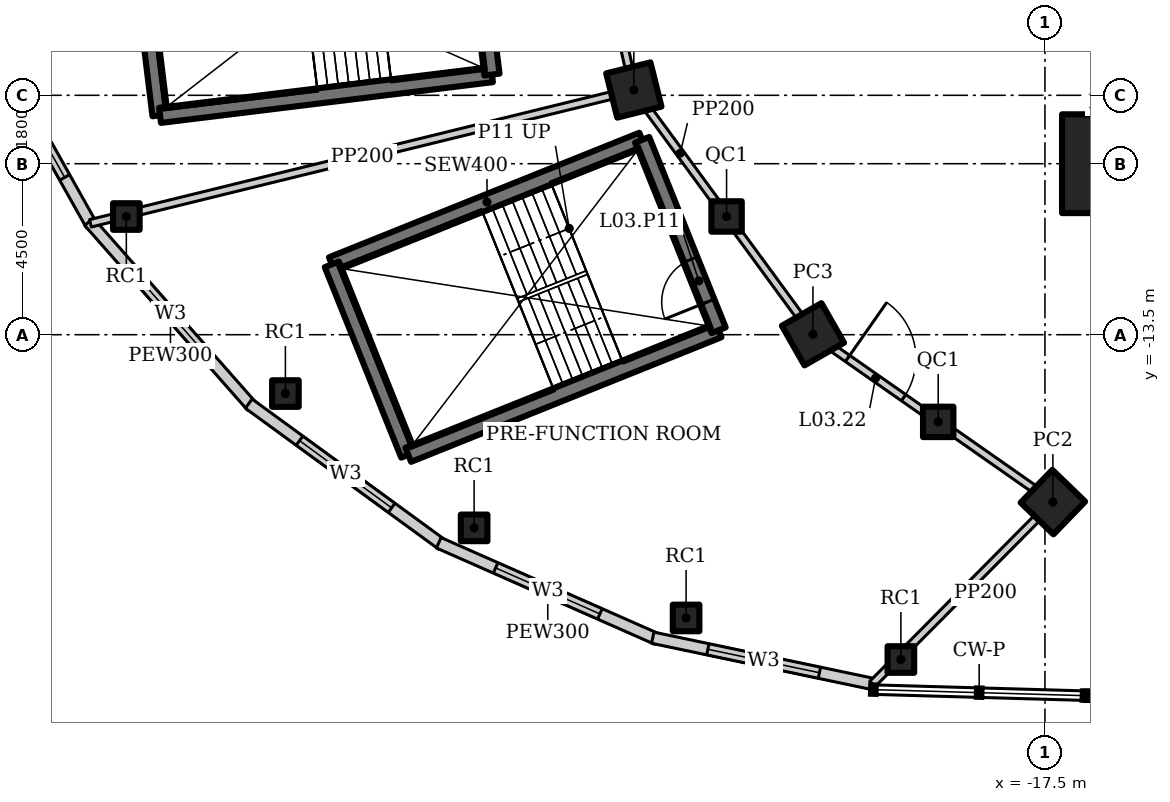
"""IFC4 building model, lengths in metres.
Left out: names, types, materials, properties, quantities, classifications, styles, units other than length and angle.
Written with IfcOpenShell. Run it as: python <this file> out.ifc"""

import sys

from ifc_helpers import new_model, si_unit, direction, frame, frame_2d, origin, origin_2d, place, context, subcontext, project, spatial, rectangle, hollow_rectangle, extrude, element, fill, save


model = new_model("IFC4")
c1 = context("Model", 3, precision=1e-05, world=origin(), true_north=direction((0.0, 1.0)))
c2 = subcontext(c1, "Body", "Model", "MODEL_VIEW")
j1 = project(units=[si_unit("LENGTHUNIT", "METRE"), si_unit("PLANEANGLEUNIT", "RADIAN")], contexts=[c1])
p1 = place(None, origin())
s1 = spatial("IfcSite", under=j1, at=p1, CompositionType="ELEMENT")
p2 = place(p1, origin())
s2 = spatial("IfcBuilding", under=s1, at=p2, CompositionType="ELEMENT")
p3 = place(p2, frame((0.0, 0.0, 22.0)))
s3 = spatial("IfcBuildingStorey", under=s2, at=p3, CompositionType="ELEMENT", Elevation=22.0)
p4 = place(p3, frame((-15.75, -9.0, 0.0), z_axis=(0.0, 0.0, 1.0), x_axis=(1.0, 0.0, 0.0)))
e1 = element("IfcColumn", 1, at=p4, inside=s3, PredefinedType="COLUMN", context=c2, shape_type="SweptSolid", body=[
    extrude(hollow_rectangle(XDim=2.6, YDim=2.6, WallThickness=0.13, at=origin_2d()), origin(), (0.0, 0.0, 1.0), 5.0),
])
p5 = place(p3, frame((-28.318, -7.06, 0.0), z_axis=(0.0, 0.0, 1.0), x_axis=(0.970295726276, 0.2419218956, 0.0)))
e2 = element("IfcColumn", 2, at=p5, inside=s3, PredefinedType="COLUMN", context=c2, shape_type="SweptSolid", body=[
    extrude(hollow_rectangle(XDim=1.2, YDim=1.2, WallThickness=0.1, at=origin_2d()), origin(), (0.0, 0.0, 1.0), 5.0),
])
p6 = place(p3, frame((-23.605, -13.489, 0.0), z_axis=(0.0, 0.0, 1.0), x_axis=(0.86824298017, 0.496139221777, 0.0)))
e3 = element("IfcColumn", 3, at=p6, inside=s3, PredefinedType="COLUMN", context=c2, shape_type="SweptSolid", body=[
    extrude(hollow_rectangle(XDim=1.2, YDim=1.2, WallThickness=0.12, at=origin_2d()), origin(), (0.0, 0.0, 1.0), 5.0),
])
p7 = place(p3, frame((-17.291, -17.905, 0.0), z_axis=(0.0, 0.0, 1.0), x_axis=(0.694658370459, 0.719339800339, 0.0)))
e4 = element("IfcColumn", 4, at=p7, inside=s3, PredefinedType="COLUMN", context=c2, shape_type="SweptSolid", body=[
    extrude(hollow_rectangle(XDim=1.2, YDim=1.2, WallThickness=0.1, at=origin_2d()), origin(), (0.0, 0.0, 1.0), 5.0),
])
for number, where, z_axis, x_axis in (
    (5, (-25.878, -10.388, 0.0), (0.0, 0.0, 1.0), (1.0, 0.0, 0.0)),
    (6, (-20.309, -15.794, 0.0), (0.0, 0.0, 1.0), (1.0, 0.0, 0.0)),
):
    element("IfcColumn", number, at=place(p3, frame(where, z_axis=z_axis, x_axis=x_axis)), inside=s3, PredefinedType="COLUMN", context=c2, shape_type="SweptSolid", body=[
        extrude(hollow_rectangle(XDim=0.8, YDim=0.8, WallThickness=0.05, at=origin_2d()), origin(), (0.0, 0.0, 1.0), 5.0),
    ])
for number, where, z_axis, x_axis in (
    (7, (-37.487, -15.049, 0.0), (0.0, 0.0, 1.0), (1.0, 0.0, 0.0)),
    (8, (-26.943, -20.954, 0.0), (0.0, 0.0, 1.0), (1.0, 0.0, 0.0)),
    (9, (-41.672, -10.39, 0.0), (0.0, 0.0, 1.0), (1.0, 0.0, 0.0)),
    (10, (-32.521, -18.583, 0.0), (0.0, 0.0, 1.0), (1.0, 0.0, 0.0)),
    (11, (-21.291, -22.047, 0.0), (0.0, 0.0, 1.0), (1.0, 0.0, 0.0)),
):
    element("IfcColumn", number, at=place(p3, frame(where, z_axis=z_axis, x_axis=x_axis)), inside=s3, PredefinedType="COLUMN", context=c2, shape_type="SweptSolid", body=[
        extrude(hollow_rectangle(XDim=0.7, YDim=0.7, WallThickness=0.04, at=origin_2d()), origin(), (0.0, 0.0, 1.0), 5.0),
    ])
p8 = place(p3, frame((-45.469, -5.488, 0.0), z_axis=(0.0, 0.0, 1.0), x_axis=(0.489563544979, -0.871967622924, 0.0)))
e12 = element("IfcWall", 12, at=p8, inside=s3, PredefinedType="SOLIDWALL", context=c2, shape_type="SweptSolid", body=[
    extrude(rectangle(XDim=5.883, YDim=0.3, at=frame_2d((2.941, 0.0))), origin(), (0.0, 0.0, 1.0), 4.8),
])
p9 = place(p8, frame((1.441, 0.0, 0.9)))
e13 = element("IfcOpeningElement", 13, at=p9, cuts=e12, PredefinedType="OPENING", context=c2, shape_type="SweptSolid", body=[
    extrude(rectangle(XDim=3.0, YDim=2.0, at=frame_2d((1.5, 1.0))), frame((0.0, 0.16, 0.0), z_axis=(0.0, -1.0, 0.0), x_axis=(1.0, 0.0, 0.0)), (0.0, 0.0, 1.0), 0.32),
])
p10 = place(p3, frame((-42.654, -10.527, 0.0), z_axis=(0.0, 0.0, 1.0), x_axis=(0.661196672464, -0.75021261008, 0.0)))
e14 = element("IfcWall", 14, at=p10, inside=s3, PredefinedType="SOLIDWALL", context=c2, shape_type="SweptSolid", body=[
    extrude(rectangle(XDim=6.481, YDim=0.3, at=frame_2d((3.24, 0.0))), origin(), (0.0, 0.0, 1.0), 4.8),
])
p11 = place(p10, frame((1.74, 0.0, 0.9)))
e15 = element("IfcOpeningElement", 15, at=p11, cuts=e14, PredefinedType="OPENING", context=c2, shape_type="SweptSolid", body=[
    extrude(rectangle(XDim=3.0, YDim=2.0, at=frame_2d((1.5, 1.0))), frame((0.0, 0.16, 0.0), z_axis=(0.0, -1.0, 0.0), x_axis=(1.0, 0.0, 0.0)), (0.0, 0.0, 1.0), 0.32),
])
p12 = place(p3, frame((-38.451, -15.314, 0.0), z_axis=(0.0, 0.0, 1.0), x_axis=(0.807903497184, -0.589314804868, 0.0)))
e16 = element("IfcWall", 16, at=p12, inside=s3, PredefinedType="SOLIDWALL", context=c2, shape_type="SweptSolid", body=[
    extrude(rectangle(XDim=6.308, YDim=0.3, at=frame_2d((3.154, 0.0))), origin(), (0.0, 0.0, 1.0), 4.8),
])
p13 = place(p12, frame((1.654, 0.0, 0.9)))
e17 = element("IfcOpeningElement", 17, at=p13, cuts=e16, PredefinedType="OPENING", context=c2, shape_type="SweptSolid", body=[
    extrude(rectangle(XDim=3.0, YDim=2.0, at=frame_2d((1.5, 1.0))), frame((0.0, 0.16, 0.0), z_axis=(0.0, -1.0, 0.0), x_axis=(1.0, 0.0, 0.0)), (0.0, 0.0, 1.0), 0.32),
])
p14 = place(p3, frame((-33.451, -18.976, 0.0), z_axis=(0.0, 0.0, 1.0), x_axis=(0.914840828207, -0.40381463451, 0.0)))
e18 = element("IfcWall", 18, at=p14, inside=s3, PredefinedType="SOLIDWALL", context=c2, shape_type="SweptSolid", body=[
    extrude(rectangle(XDim=6.271, YDim=0.3, at=frame_2d((3.136, 0.0))), origin(), (0.0, 0.0, 1.0), 4.8),
])
p15 = place(p14, frame((1.636, 0.0, 0.9)))
e19 = element("IfcOpeningElement", 19, at=p15, cuts=e18, PredefinedType="OPENING", context=c2, shape_type="SweptSolid", body=[
    extrude(rectangle(XDim=3.0, YDim=2.0, at=frame_2d((1.5, 1.0))), frame((0.0, 0.16, 0.0), z_axis=(0.0, -1.0, 0.0), x_axis=(1.0, 0.0, 0.0)), (0.0, 0.0, 1.0), 0.32),
])
p16 = place(p3, frame((-27.82, -21.474, 0.0), z_axis=(0.0, 0.0, 1.0), x_axis=(0.978625319268, -0.205651366364, 0.0)))
e20 = element("IfcWall", 20, at=p16, inside=s3, PredefinedType="SOLIDWALL", context=c2, shape_type="SweptSolid", body=[
    extrude(rectangle(XDim=5.962, YDim=0.3, at=frame_2d((2.981, 0.0))), origin(), (0.0, 0.0, 1.0), 4.8),
])
p17 = place(p16, frame((1.481, 0.0, 0.9)))
e21 = element("IfcOpeningElement", 21, at=p17, cuts=e20, PredefinedType="OPENING", context=c2, shape_type="SweptSolid", body=[
    extrude(rectangle(XDim=3.0, YDim=2.0, at=frame_2d((1.5, 1.0))), frame((0.0, 0.16, 0.0), z_axis=(0.0, -1.0, 0.0), x_axis=(1.0, 0.0, 0.0)), (0.0, 0.0, 1.0), 0.32),
])
p18 = place(p3, frame((-29.099, -3.573, 0.0), z_axis=(0.0, 0.0, 1.0), x_axis=(0.218673326171, -0.97579812278, 0.0)))
e22 = element("IfcWall", 22, at=p18, inside=s3, PredefinedType="SOLIDWALL", context=c2, shape_type="SweptSolid", body=[
    extrude(rectangle(XDim=3.574, YDim=0.2, at=frame_2d((1.787, 0.0))), origin(), (0.0, 0.0, 1.0), 4.396),
])
p19 = place(p3, frame((-28.318, -7.06, 0.0), z_axis=(0.0, 0.0, 1.0), x_axis=(0.591255937291, -0.806483984105, 0.0)))
e23 = element("IfcWall", 23, at=p19, inside=s3, PredefinedType="SOLIDWALL", context=c2, shape_type="SweptSolid", body=[
    extrude(rectangle(XDim=4.127, YDim=0.2, at=frame_2d((2.063, 0.0))), origin(), (0.0, 0.0, 1.0), 3.3),
])
p20 = place(p3, frame((-25.878, -10.388, 0.0), z_axis=(0.0, 0.0, 1.0), x_axis=(0.591286566758, -0.806461527893, 0.0)))
e24 = element("IfcWall", 24, at=p20, inside=s3, PredefinedType="SOLIDWALL", context=c2, shape_type="SweptSolid", body=[
    extrude(rectangle(XDim=3.844, YDim=0.2, at=frame_2d((1.922, 0.0))), origin(), (0.0, 0.0, 1.0), 4.396),
])
p21 = place(p3, frame((-23.605, -13.489, 0.0), z_axis=(0.0, 0.0, 1.0), x_axis=(0.819442856133, -0.573160889744, 0.0)))
e25 = element("IfcWall", 25, at=p21, inside=s3, PredefinedType="SOLIDWALL", context=c2, shape_type="SweptSolid", body=[
    extrude(rectangle(XDim=4.023, YDim=0.2, at=frame_2d((2.011, 0.0))), origin(), (0.0, 0.0, 1.0), 3.3),
])
p22 = place(p21, frame((1.111, 0.0, 0.0)))
e26 = element("IfcOpeningElement", 26, at=p22, cuts=e25, PredefinedType="OPENING", context=c2, shape_type="SweptSolid", body=[
    extrude(rectangle(XDim=1.8, YDim=2.4, at=frame_2d((0.9, 1.2))), frame((0.0, 0.11, 0.0), z_axis=(0.0, -1.0, 0.0), x_axis=(1.0, 0.0, 0.0)), (0.0, 0.0, 1.0), 0.22),
])
p23 = place(p3, frame((-20.309, -15.794, 0.0), z_axis=(0.0, 0.0, 1.0), x_axis=(0.819409395821, -0.573208724672, 0.0)))
e27 = element("IfcWall", 27, at=p23, inside=s3, PredefinedType="SOLIDWALL", context=c2, shape_type="SweptSolid", body=[
    extrude(rectangle(XDim=3.683, YDim=0.2, at=frame_2d((1.841, 0.0))), origin(), (0.0, 0.0, 1.0), 4.396),
])
p24 = place(p3, frame((-28.318, -7.06, 0.0), z_axis=(0.0, 0.0, 1.0), x_axis=(-0.971190644534, -0.238303864783, 0.0)))
e28 = element("IfcWall", 28, at=p24, inside=s3, PredefinedType="SOLIDWALL", context=c2, shape_type="SweptSolid", body=[
    extrude(rectangle(XDim=14.723, YDim=0.2, at=frame_2d((7.361, 0.0))), origin(), (0.0, 0.0, 1.0), 3.3),
])
p25 = place(p3, frame((-17.291, -17.905, 0.0), z_axis=(0.0, 0.0, 1.0), x_axis=(-0.704348079756, -0.709854761585, 0.0)))
e29 = element("IfcWall", 29, at=p25, inside=s3, PredefinedType="SOLIDWALL", context=c2, shape_type="SweptSolid", body=[
    extrude(rectangle(XDim=6.739, YDim=0.2, at=frame_2d((3.37, 0.0))), origin(), (0.0, 0.0, 1.0), 4.198),
])
p26 = place(p3, frame((-41.443, -2.368, 0.0), z_axis=(0.0, 0.0, 1.0), x_axis=(0.121892082937, -0.992543359314, 0.0)))
e30 = element("IfcWall", 30, at=p26, inside=s3, PredefinedType="SHEAR", context=c2, shape_type="SweptSolid", body=[
    extrude(rectangle(XDim=5.4, YDim=0.4, at=frame_2d((2.7, 0.0))), origin(), (0.0, 0.0, 1.0), 5.0),
])
p27 = place(p3, frame((-40.785, -7.728, 0.0), z_axis=(0.0, 0.0, 1.0), x_axis=(0.992545280606, 0.121876437212, 0.0)))
e31 = element("IfcWall", 31, at=p27, inside=s3, PredefinedType="SHEAR", context=c2, shape_type="SweptSolid", body=[
    extrude(rectangle(XDim=8.8, YDim=0.4, at=frame_2d((4.4, 0.0))), origin(), (0.0, 0.0, 1.0), 5.0),
])
p28 = place(p3, frame((-32.051, -6.656, 0.0), z_axis=(0.0, 0.0, 1.0), x_axis=(-0.12184754212, 0.99254882826, 0.0)))
e32 = element("IfcWall", 32, at=p28, inside=s3, PredefinedType="SHEAR", context=c2, shape_type="SweptSolid", body=[
    extrude(rectangle(XDim=5.4, YDim=0.4, at=frame_2d((2.7, 0.0))), origin(), (0.0, 0.0, 1.0), 5.0),
])
p29 = place(p28, frame((0.8, 0.0, 0.0)))
e33 = element("IfcOpeningElement", 33, at=p29, cuts=e32, PredefinedType="OPENING", context=c2, shape_type="SweptSolid", body=[
    extrude(rectangle(XDim=1.2, YDim=2.1, at=frame_2d((0.6, 1.05))), frame((0.0, 0.21, 0.0), z_axis=(0.0, -1.0, 0.0), x_axis=(1.0, 0.0, 0.0)), (0.0, 0.0, 1.0), 0.42),
])
p30 = place(p3, frame((-28.099, -8.371, 0.0), z_axis=(0.0, 0.0, 1.0), x_axis=(-0.92801678004, -0.372538395288, 0.0)))
e34 = element("IfcWall", 34, at=p30, inside=s3, PredefinedType="SHEAR", context=c2, shape_type="SweptSolid", body=[
    extrude(rectangle(XDim=8.8, YDim=0.4, at=frame_2d((4.4, 0.0))), origin(), (0.0, 0.0, 1.0), 5.0),
])
p31 = place(p3, frame((-36.265, -11.649, 0.0), z_axis=(0.0, 0.0, 1.0), x_axis=(0.372544066459, -0.928014503414, 0.0)))
e35 = element("IfcWall", 35, at=p31, inside=s3, PredefinedType="SHEAR", context=c2, shape_type="SweptSolid", body=[
    extrude(rectangle(XDim=5.4, YDim=0.4, at=frame_2d((2.7, 0.0))), origin(), (0.0, 0.0, 1.0), 5.0),
])
p32 = place(p3, frame((-34.253, -16.66, 0.0), z_axis=(0.0, 0.0, 1.0), x_axis=(0.92801678004, 0.372538395288, 0.0)))
e36 = element("IfcWall", 36, at=p32, inside=s3, PredefinedType="SHEAR", context=c2, shape_type="SweptSolid", body=[
    extrude(rectangle(XDim=8.8, YDim=0.4, at=frame_2d((4.4, 0.0))), origin(), (0.0, 0.0, 1.0), 5.0),
])
p33 = place(p3, frame((-26.087, -13.382, 0.0), z_axis=(0.0, 0.0, 1.0), x_axis=(-0.372544066459, 0.928014503414, 0.0)))
e37 = element("IfcWall", 37, at=p33, inside=s3, PredefinedType="SHEAR", context=c2, shape_type="SweptSolid", body=[
    extrude(rectangle(XDim=5.4, YDim=0.4, at=frame_2d((2.7, 0.0))), origin(), (0.0, 0.0, 1.0), 5.0),
])
p34 = place(p33, frame((0.8, 0.0, 0.0)))
e38 = element("IfcOpeningElement", 38, at=p34, cuts=e37, PredefinedType="OPENING", context=c2, shape_type="SweptSolid", body=[
    extrude(rectangle(XDim=1.2, YDim=2.1, at=frame_2d((0.6, 1.05))), frame((0.0, 0.21, 0.0), z_axis=(0.0, -1.0, 0.0), x_axis=(1.0, 0.0, 0.0)), (0.0, 0.0, 1.0), 0.42),
])
p35 = place(p9, origin())
e39 = element("IfcWindow", 39, at=p35, inside=s3, PartitioningType="SINGLE_PANEL", PredefinedType="WINDOW", context=c2, shape_type="SweptSolid", body=[
    extrude(rectangle(XDim=3.0, YDim=2.0, at=frame_2d((1.5, 1.0))), frame((0.0, 0.03, 0.0), z_axis=(0.0, -1.0, 0.0), x_axis=(1.0, 0.0, 0.0)), (0.0, 0.0, 1.0), 0.06),
])
fill(e13, e39)
p36 = place(p11, origin())
e40 = element("IfcWindow", 40, at=p36, inside=s3, PartitioningType="SINGLE_PANEL", PredefinedType="WINDOW", context=c2, shape_type="SweptSolid", body=[
    extrude(rectangle(XDim=3.0, YDim=2.0, at=frame_2d((1.5, 1.0))), frame((0.0, 0.03, 0.0), z_axis=(0.0, -1.0, 0.0), x_axis=(1.0, 0.0, 0.0)), (0.0, 0.0, 1.0), 0.06),
])
fill(e15, e40)
p37 = place(p13, origin())
e41 = element("IfcWindow", 41, at=p37, inside=s3, PartitioningType="SINGLE_PANEL", PredefinedType="WINDOW", context=c2, shape_type="SweptSolid", body=[
    extrude(rectangle(XDim=3.0, YDim=2.0, at=frame_2d((1.5, 1.0))), frame((0.0, 0.03, 0.0), z_axis=(0.0, -1.0, 0.0), x_axis=(1.0, 0.0, 0.0)), (0.0, 0.0, 1.0), 0.06),
])
fill(e17, e41)
p38 = place(p15, origin())
e42 = element("IfcWindow", 42, at=p38, inside=s3, PartitioningType="SINGLE_PANEL", PredefinedType="WINDOW", context=c2, shape_type="SweptSolid", body=[
    extrude(rectangle(XDim=3.0, YDim=2.0, at=frame_2d((1.5, 1.0))), frame((0.0, 0.03, 0.0), z_axis=(0.0, -1.0, 0.0), x_axis=(1.0, 0.0, 0.0)), (0.0, 0.0, 1.0), 0.06),
])
fill(e19, e42)
p39 = place(p17, origin())
e43 = element("IfcWindow", 43, at=p39, inside=s3, PartitioningType="SINGLE_PANEL", PredefinedType="WINDOW", context=c2, shape_type="SweptSolid", body=[
    extrude(rectangle(XDim=3.0, YDim=2.0, at=frame_2d((1.5, 1.0))), frame((0.0, 0.03, 0.0), z_axis=(0.0, -1.0, 0.0), x_axis=(1.0, 0.0, 0.0)), (0.0, 0.0, 1.0), 0.06),
])
fill(e21, e43)
p40 = place(p22, origin())
e44 = element("IfcDoor", 44, at=p40, inside=s3, OperationType="DOUBLE_DOOR_DOUBLE_SWING", PredefinedType="DOOR", context=c2, shape_type="SweptSolid", body=[
    extrude(rectangle(XDim=1.8, YDim=2.4, at=frame_2d((0.9, 1.2))), frame((0.0, 0.025, 0.0), z_axis=(0.0, -1.0, 0.0), x_axis=(1.0, 0.0, 0.0)), (0.0, 0.0, 1.0), 0.05),
])
fill(e26, e44)
p41 = place(p34, origin())
e45 = element("IfcDoor", 45, at=p41, inside=s3, OperationType="SINGLE_SWING_RIGHT", PredefinedType="DOOR", context=c2, shape_type="SweptSolid", body=[
    extrude(rectangle(XDim=1.2, YDim=2.1, at=frame_2d((0.6, 1.05))), frame((0.0, 0.025, 0.0), z_axis=(0.0, -1.0, 0.0), x_axis=(1.0, 0.0, 0.0)), (0.0, 0.0, 1.0), 0.05),
])
fill(e38, e45)
save(model, sys.argv[1])
